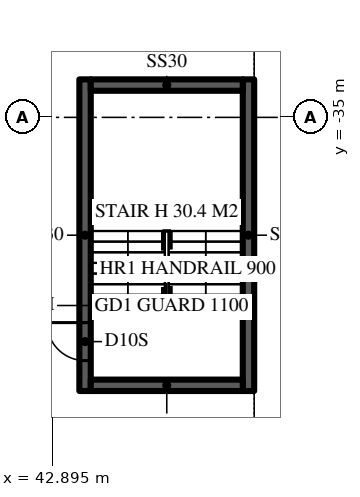
"""IFC4 building model, lengths in metres.
Left out: names, types, materials, properties, quantities, classifications, styles, units other than length and angle.
Written with IfcOpenShell. Run it as: python <this file> out.ifc"""

import sys

from ifc_helpers import new_model, si_unit, direction, frame, frame_2d, origin, place, context, subcontext, project, spatial, rectangle, extrude, element, fill, save


model = new_model("IFC4")
c1 = context("Model", 3, precision=1e-05, world=origin(), true_north=direction((0.0, 1.0)))
c2 = subcontext(c1, "Body", "Model", "MODEL_VIEW")
j1 = project(units=[si_unit("LENGTHUNIT", "METRE"), si_unit("PLANEANGLEUNIT", "RADIAN")], contexts=[c1])
p1 = place(None, origin())
s1 = spatial("IfcSite", under=j1, at=p1, CompositionType="ELEMENT")
p2 = place(p1, origin())
s2 = spatial("IfcBuilding", under=s1, at=p2, CompositionType="ELEMENT")
p3 = place(p2, frame((0.0, 0.0, -10.0)))
s3 = spatial("IfcBuildingStorey", under=s2, at=p3, CompositionType="ELEMENT", Elevation=-10.0)
p4 = place(p3, frame((48.5, -48.2, -0.5), z_axis=(0.0, 0.0, 1.0), x_axis=(0.0, 1.0, 0.0)))
e1 = element("IfcWall", 1, at=p4, inside=s3, PredefinedType="SOLIDWALL", context=c2, shape_type="SweptSolid", body=[
    extrude(rectangle(XDim=96.4, YDim=0.6, at=frame_2d((48.2, 0.0))), origin(), (0.0, 0.0, 1.0), 10.1),
])
p5 = place(p2, frame((0.0, 0.0, -5.0)))
s4 = spatial("IfcBuildingStorey", under=s2, at=p5, CompositionType="ELEMENT", Elevation=-5.0)
p6 = place(p5, frame((43.75, -42.2, 0.0), z_axis=(0.0, 0.0, 1.0), x_axis=(0.0, 1.0, 0.0)))
e2 = element("IfcWall", 2, at=p6, inside=s4, PredefinedType="SOLIDWALL", context=c2, shape_type="SweptSolid", body=[
    extrude(rectangle(XDim=8.2, YDim=0.3, at=frame_2d((4.1, 0.0))), origin(), (0.0, 0.0, 1.0), 4.6),
])
p7 = place(p6, frame((0.8, 0.0, 0.0)))
e3 = element("IfcOpeningElement", 3, at=p7, cuts=e2, PredefinedType="OPENING", context=c2, shape_type="SweptSolid", body=[
    extrude(rectangle(XDim=1.0, YDim=2.2, at=frame_2d((0.5, 1.1))), frame((0.0, 0.16, 0.0), z_axis=(0.0, -1.0, 0.0), x_axis=(1.0, 0.0, 0.0)), (0.0, 0.0, 1.0), 0.32),
])
p8 = place(p5, frame((48.05, -34.0, 0.0), z_axis=(0.0, 0.0, 1.0), x_axis=(0.0, -1.0, 0.0)))
e4 = element("IfcWall", 4, at=p8, inside=s4, PredefinedType="SOLIDWALL", context=c2, shape_type="SweptSolid", body=[
    extrude(rectangle(XDim=8.2, YDim=0.3, at=frame_2d((4.1, 0.0))), origin(), (0.0, 0.0, 1.0), 4.6),
])
for number, where, z_axis, x_axis in (
    (5, (43.9, -42.05, 0.0), (0.0, 0.0, 1.0), (1.0, 0.0, 0.0)),
    (6, (47.9, -34.15, 0.0), (0.0, 0.0, 1.0), (-1.0, 0.0, 0.0)),
):
    element("IfcWall", number, at=place(p5, frame(where, z_axis=z_axis, x_axis=x_axis)), inside=s4, PredefinedType="SOLIDWALL", context=c2, shape_type="SweptSolid", body=[
        extrude(rectangle(XDim=4.0, YDim=0.3, at=frame_2d((2.0, 0.0))), origin(), (0.0, 0.0, 1.0), 4.6),
    ])
p9 = place(p7, origin())
e7 = element("IfcDoor", 7, at=p9, inside=s4, OperationType="SINGLE_SWING_RIGHT", PredefinedType="DOOR", context=c2, shape_type="SweptSolid", body=[
    extrude(rectangle(XDim=1.0, YDim=2.2, at=frame_2d((0.5, 1.1))), frame((0.0, 0.025, 0.0), z_axis=(0.0, -1.0, 0.0), x_axis=(1.0, 0.0, 0.0)), (0.0, 0.0, 1.0), 0.05),
])
fill(e3, e7)
save(model, sys.argv[1])
